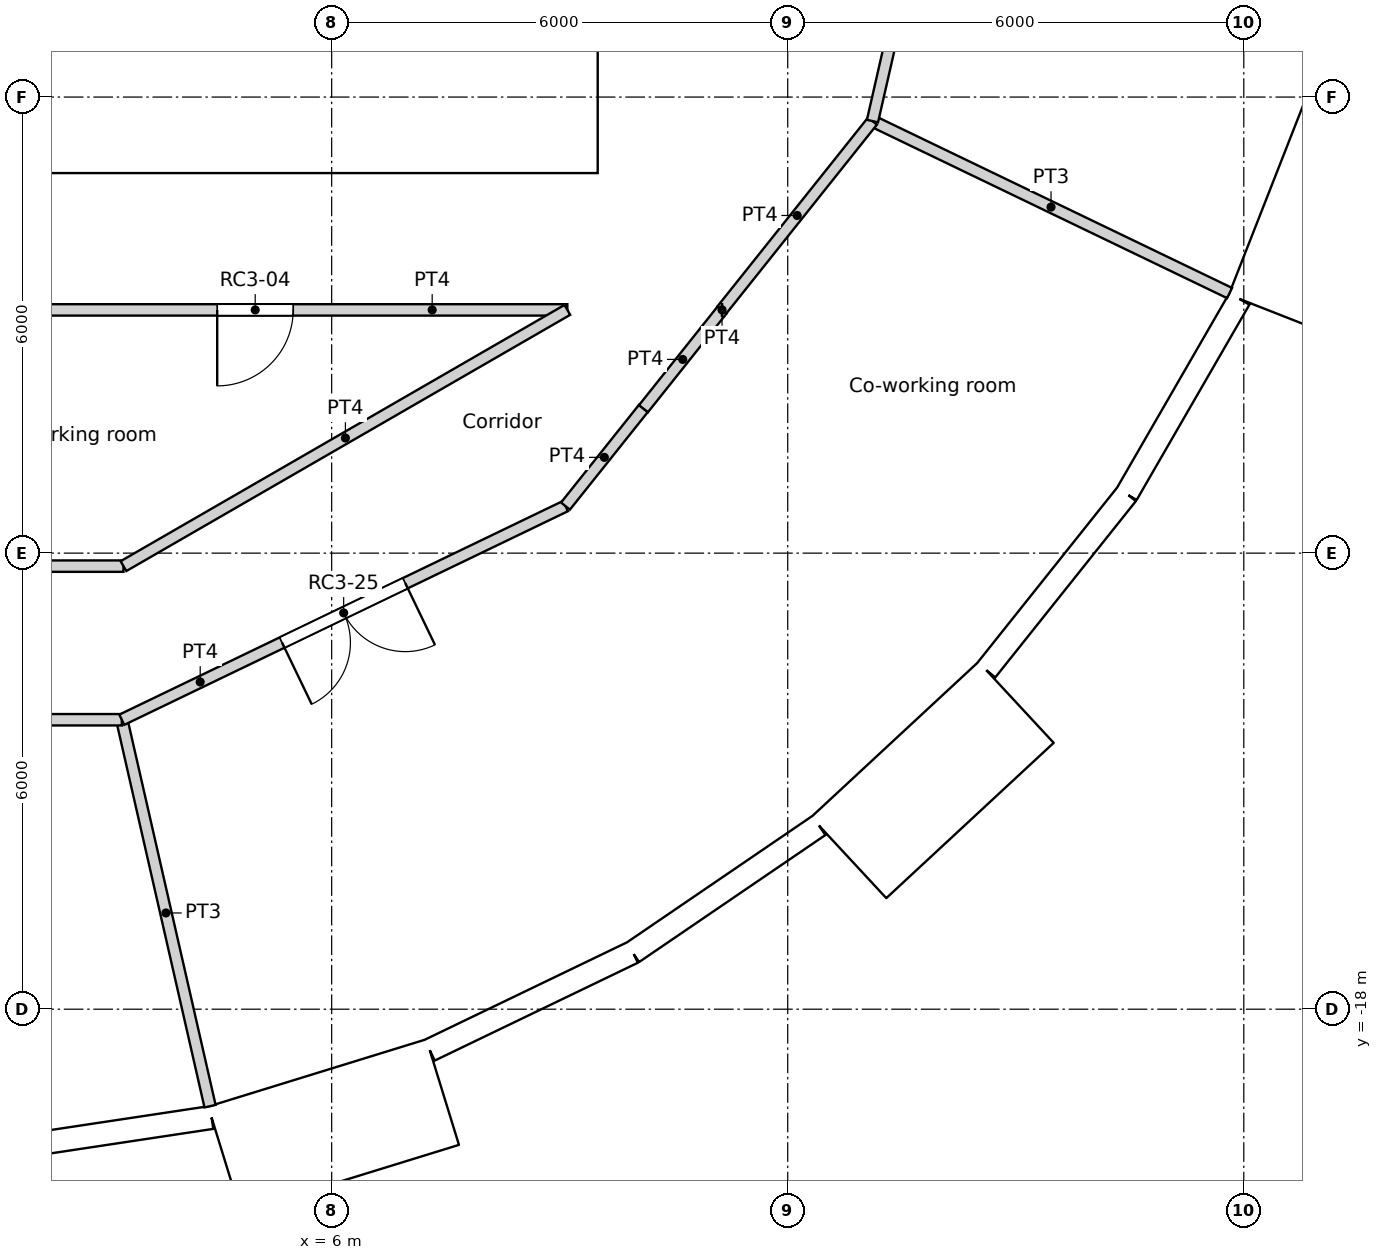
"""IFC4 building model, lengths in metres.
Left out: names, types, materials, properties, quantities, classifications, styles, units other than length and angle.
Written with IfcOpenShell. Run it as: python <this file> out.ifc"""

import sys

from ifc_helpers import new_model, si_unit, direction, frame, frame_2d, origin, origin_2d, place, context, subcontext, project, spatial, rectangle, circle, extrude, element, fill, save


model = new_model("IFC4")
c1 = context("Model", 3, precision=1e-05, world=origin(), true_north=direction((0.0, 1.0)))
c2 = subcontext(c1, "Body", "Model", "MODEL_VIEW")
j1 = project(units=[si_unit("LENGTHUNIT", "METRE"), si_unit("PLANEANGLEUNIT", "RADIAN")], contexts=[c1])
p1 = place(None, origin())
s1 = spatial("IfcSite", under=j1, at=p1, CompositionType="ELEMENT")
p2 = place(p1, origin())
s2 = spatial("IfcBuilding", under=s1, at=p2, CompositionType="ELEMENT")
p3 = place(p2, frame((0.0, 0.0, 252.6)))
s3 = spatial("IfcBuildingStorey", under=s2, at=p3, CompositionType="ELEMENT", Elevation=252.6)
for number, where, z_axis, x_axis in (
    (1, (6.876, -17.521, 0.0), (0.0, 0.0, 1.0), (1.0, 0.0, 0.0)),
    (2, (11.735, -14.716, 0.0), (0.0, 0.0, 1.0), (1.0, 0.0, 0.0)),
    (3, (15.552, -10.603, 0.0), (0.0, 0.0, 1.0), (1.0, 0.0, 0.0)),
    (4, (17.986, -5.548, 0.0), (0.0, 0.0, 1.0), (1.0, 0.0, 0.0)),
):
    element("IfcColumn", number, at=place(p3, frame(where, z_axis=z_axis, x_axis=x_axis)), inside=s3, PredefinedType="COLUMN", context=c2, shape_type="SweptSolid", body=[
        extrude(circle(Radius=0.55, at=origin_2d()), origin(), (0.0, 0.0, 1.0), 3.6),
    ])
p4 = place(p3, frame((1.489, -19.866, 0.0), z_axis=(0.0, 0.0, 1.0), x_axis=(0.988835775663, 0.149009425104, 0.0)))
e5 = element("IfcWall", 5, at=p4, inside=s3, PredefinedType="SOLIDWALL", context=c2, shape_type="SweptSolid", body=[
    extrude(rectangle(XDim=2.962, YDim=0.3, at=frame_2d((1.481, 0.0))), origin(), (0.0, 0.0, 1.0), 3.25),
])
p5 = place(p4, frame((1.481, 0.0, 1.55)))
e6 = element("IfcOpeningElement", 6, at=p5, cuts=e5, PredefinedType="OPENING", context=c2, shape_type="SweptSolid", body=[
    extrude(circle(Radius=0.9, at=origin_2d()), frame((0.0, 0.16, 0.0), z_axis=(0.0, -1.0, 0.0), x_axis=(1.0, 0.0, 0.0)), (0.0, 0.0, 1.0), 0.32),
])
p6 = place(p3, frame((4.592, -19.975, -0.35), z_axis=(0.0, 0.0, 1.0), x_axis=(0.955571139978, 0.294760574774, 0.0)))
e7 = element("IfcWall", 7, at=p6, inside=s3, PredefinedType="ELEMENTEDWALL", context=c2, shape_type="SweptSolid", body=[
    extrude(rectangle(XDim=3.0, YDim=1.45, at=frame_2d((1.5, 0.0))), origin(), (0.0, 0.0, 1.0), 3.6),
])
p7 = place(p6, frame((1.5, 0.0, 1.9)))
e8 = element("IfcOpeningElement", 8, at=p7, cuts=e7, PredefinedType="OPENING", context=c2, shape_type="SweptSolid", body=[
    extrude(circle(Radius=0.9, at=origin_2d()), frame((0.0, 0.735, 0.0), z_axis=(0.0, -1.0, 0.0), x_axis=(1.0, 0.0, 0.0)), (0.0, 0.0, 1.0), 1.47),
])
p8 = place(p3, frame((7.292, -18.538, 0.0), z_axis=(0.0, 0.0, 1.0), x_axis=(0.90095513435, 0.433912255978, 0.0)))
e9 = element("IfcWall", 9, at=p8, inside=s3, PredefinedType="SOLIDWALL", context=c2, shape_type="SweptSolid", body=[
    extrude(rectangle(XDim=2.962, YDim=0.3, at=frame_2d((1.481, 0.0))), origin(), (0.0, 0.0, 1.0), 3.25),
])
p9 = place(p8, frame((1.481, 0.0, 1.55)))
e10 = element("IfcOpeningElement", 10, at=p9, cuts=e9, PredefinedType="OPENING", context=c2, shape_type="SweptSolid", body=[
    extrude(circle(Radius=0.9, at=origin_2d()), frame((0.0, 0.16, 0.0), z_axis=(0.0, -1.0, 0.0), x_axis=(1.0, 0.0, 0.0)), (0.0, 0.0, 1.0), 0.32),
])
p10 = place(p3, frame((9.961, -17.253, 0.0), z_axis=(0.0, 0.0, 1.0), x_axis=(0.826236061068, 0.563324037646, 0.0)))
e11 = element("IfcWall", 11, at=p10, inside=s3, PredefinedType="SOLIDWALL", context=c2, shape_type="SweptSolid", body=[
    extrude(rectangle(XDim=2.962, YDim=0.3, at=frame_2d((1.481, 0.0))), origin(), (0.0, 0.0, 1.0), 3.25),
])
p11 = place(p10, frame((1.481, 0.0, 1.55)))
e12 = element("IfcOpeningElement", 12, at=p11, cuts=e11, PredefinedType="OPENING", context=c2, shape_type="SweptSolid", body=[
    extrude(circle(Radius=0.9, at=origin_2d()), frame((0.0, 0.16, 0.0), z_axis=(0.0, -1.0, 0.0), x_axis=(1.0, 0.0, 0.0)), (0.0, 0.0, 1.0), 0.32),
])
p12 = place(p3, frame((12.804, -16.005, -0.35), z_axis=(0.0, 0.0, 1.0), x_axis=(0.733022439167, 0.680204457261, 0.0)))
e13 = element("IfcWall", 13, at=p12, inside=s3, PredefinedType="ELEMENTEDWALL", context=c2, shape_type="SweptSolid", body=[
    extrude(rectangle(XDim=3.0, YDim=1.45, at=frame_2d((1.5, 0.0))), origin(), (0.0, 0.0, 1.0), 3.6),
])
p13 = place(p12, frame((1.5, 0.0, 1.9)))
e14 = element("IfcOpeningElement", 14, at=p13, cuts=e13, PredefinedType="OPENING", context=c2, shape_type="SweptSolid", body=[
    extrude(circle(Radius=0.9, at=origin_2d()), frame((0.0, 0.735, 0.0), z_axis=(0.0, -1.0, 0.0), x_axis=(1.0, 0.0, 0.0)), (0.0, 0.0, 1.0), 1.47),
])
p14 = place(p3, frame((14.613, -13.538, 0.0), z_axis=(0.0, 0.0, 1.0), x_axis=(0.623498236992, 0.781824755599, 0.0)))
e15 = element("IfcWall", 15, at=p14, inside=s3, PredefinedType="SOLIDWALL", context=c2, shape_type="SweptSolid", body=[
    extrude(rectangle(XDim=2.962, YDim=0.3, at=frame_2d((1.481, 0.0))), origin(), (0.0, 0.0, 1.0), 3.25),
])
p15 = place(p14, frame((1.481, 0.0, 1.55)))
e16 = element("IfcOpeningElement", 16, at=p15, cuts=e15, PredefinedType="OPENING", context=c2, shape_type="SweptSolid", body=[
    extrude(circle(Radius=0.9, at=origin_2d()), frame((0.0, 0.16, 0.0), z_axis=(0.0, -1.0, 0.0), x_axis=(1.0, 0.0, 0.0)), (0.0, 0.0, 1.0), 0.32),
])
p16 = place(p3, frame((16.46, -11.222, 0.0), z_axis=(0.0, 0.0, 1.0), x_axis=(0.499950756475, 0.86605383268, 0.0)))
e17 = element("IfcWall", 17, at=p16, inside=s3, PredefinedType="SOLIDWALL", context=c2, shape_type="SweptSolid", body=[
    extrude(rectangle(XDim=2.962, YDim=0.3, at=frame_2d((1.481, 0.0))), origin(), (0.0, 0.0, 1.0), 3.25),
])
p17 = place(p16, frame((1.481, 0.0, 1.55)))
e18 = element("IfcOpeningElement", 18, at=p17, cuts=e17, PredefinedType="OPENING", context=c2, shape_type="SweptSolid", body=[
    extrude(circle(Radius=0.9, at=origin_2d()), frame((0.0, 0.16, 0.0), z_axis=(0.0, -1.0, 0.0), x_axis=(1.0, 0.0, 0.0)), (0.0, 0.0, 1.0), 0.32),
])
p18 = place(p3, frame((18.48, -8.864, -0.35), z_axis=(0.0, 0.0, 1.0), x_axis=(0.36537792632, 0.93085926485, 0.0)))
e19 = element("IfcWall", 19, at=p18, inside=s3, PredefinedType="ELEMENTEDWALL", context=c2, shape_type="SweptSolid", body=[
    extrude(rectangle(XDim=3.0, YDim=1.45, at=frame_2d((1.5, 0.0))), origin(), (0.0, 0.0, 1.0), 3.6),
])
p19 = place(p18, frame((1.5, 0.0, 1.9)))
e20 = element("IfcOpeningElement", 20, at=p19, cuts=e19, PredefinedType="OPENING", context=c2, shape_type="SweptSolid", body=[
    extrude(circle(Radius=0.9, at=origin_2d()), frame((0.0, 0.735, 0.0), z_axis=(0.0, -1.0, 0.0), x_axis=(1.0, 0.0, 0.0)), (0.0, 0.0, 1.0), 1.47),
])
p20 = place(p3, frame((-9.5, -6.7, 0.0), z_axis=(0.0, 0.0, 1.0), x_axis=(1.0, 0.0, 0.0)))
e21 = element("IfcWall", 21, at=p20, inside=s3, PredefinedType="SOLIDWALL", context=c2, shape_type="SweptSolid", body=[
    extrude(rectangle(XDim=19.0, YDim=0.6, at=frame_2d((9.5, 0.0))), origin(), (0.0, 0.0, 1.0), 3.6),
])
p21 = place(p20, frame((10.4, 0.0, 0.0)))
e22 = element("IfcOpeningElement", 22, at=p21, cuts=e21, PredefinedType="OPENING", context=c2, shape_type="SweptSolid", body=[
    extrude(rectangle(XDim=1.0, YDim=2.1, at=frame_2d((0.5, 1.05))), frame((0.0, 0.3, 0.0), z_axis=(0.0, -1.0, 0.0), x_axis=(1.0, 0.0, 0.0)), (0.0, 0.0, 1.0), 0.6),
])
p22 = place(p20, frame((5.35, 0.0, 0.0)))
e23 = element("IfcOpeningElement", 23, at=p22, cuts=e21, PredefinedType="OPENING", context=c2, shape_type="SweptSolid", body=[
    extrude(rectangle(XDim=1.7, YDim=2.1, at=frame_2d((0.85, 1.05))), frame((0.0, 0.3, 0.0), z_axis=(0.0, -1.0, 0.0), x_axis=(1.0, 0.0, 0.0)), (0.0, 0.0, 1.0), 0.6),
])
p23 = place(p20, frame((11.95, 0.0, 0.0)))
e24 = element("IfcOpeningElement", 24, at=p23, cuts=e21, PredefinedType="OPENING", context=c2, shape_type="SweptSolid", body=[
    extrude(rectangle(XDim=1.7, YDim=2.1, at=frame_2d((0.85, 1.05))), frame((0.0, 0.3, 0.0), z_axis=(0.0, -1.0, 0.0), x_axis=(1.0, 0.0, 0.0)), (0.0, 0.0, 1.0), 0.6),
])
p24 = place(p3, frame((9.2, -6.4, 0.0), z_axis=(0.0, 0.0, 1.0), x_axis=(0.0, 1.0, 0.0)))
e25 = element("IfcWall", 25, at=p24, inside=s3, PredefinedType="SOLIDWALL", context=c2, shape_type="SweptSolid", body=[
    extrude(rectangle(XDim=12.8, YDim=0.6, at=frame_2d((6.4, 0.0))), origin(), (0.0, 0.0, 1.0), 3.6),
])
p25 = place(p24, frame((6.4, 0.0, 0.0)))
e26 = element("IfcOpeningElement", 26, at=p25, cuts=e25, PredefinedType="OPENING", context=c2, shape_type="SweptSolid", body=[
    extrude(rectangle(XDim=1.8, YDim=2.1, at=frame_2d((0.9, 1.05))), frame((0.0, 0.3, 0.0), z_axis=(0.0, -1.0, 0.0), x_axis=(1.0, 0.0, 0.0)), (0.0, 0.0, 1.0), 0.6),
])
p26 = place(p3, frame((2.25, -6.4, 0.0), z_axis=(0.0, 0.0, 1.0), x_axis=(0.0, 1.0, 0.0)))
e27 = element("IfcWall", 27, at=p26, inside=s3, PredefinedType="SOLIDWALL", context=c2, shape_type="SweptSolid", body=[
    extrude(rectangle(XDim=3.15, YDim=0.3, at=frame_2d((1.575, 0.0))), origin(), (0.0, 0.0, 1.0), 3.25),
])
p27 = place(p3, frame((0.896, -8.8, 0.0), z_axis=(0.0, 0.0, 1.0), x_axis=(1.0, 0.0, 0.0)))
e28 = element("IfcWall", 28, at=p27, inside=s3, PredefinedType="PARTITIONING", context=c2, shape_type="SweptSolid", body=[
    extrude(rectangle(XDim=8.205, YDim=0.15, at=frame_2d((4.102, 0.0))), origin(), (0.0, 0.0, 1.0), 3.25),
])
p28 = place(p27, frame((3.598, 0.0, 0.0)))
e29 = element("IfcOpeningElement", 29, at=p28, cuts=e28, PredefinedType="OPENING", context=c2, shape_type="SweptSolid", body=[
    extrude(rectangle(XDim=1.0, YDim=2.04, at=frame_2d((0.5, 1.02))), frame((0.0, 0.075, 0.0), z_axis=(0.0, -1.0, 0.0), x_axis=(1.0, 0.0, 0.0)), (0.0, 0.0, 1.0), 0.15),
])
p29 = place(p3, frame((11.137, -8.8, 0.0), z_axis=(0.0, 0.0, 1.0), x_axis=(-1.0, 0.0, 0.0)))
e30 = element("IfcWall", 30, at=p29, inside=s3, PredefinedType="PARTITIONING", context=c2, shape_type="SweptSolid", body=[
    extrude(rectangle(XDim=0.003, YDim=0.15, at=frame_2d((0.001, 0.0))), origin(), (0.0, 0.0, 1.0), 3.25),
])
p30 = place(p3, frame((10.101, -10.101, 0.0), z_axis=(0.0, 0.0, 1.0), x_axis=(0.623098344652, 0.782143498913, 0.0)))
e31 = element("IfcWall", 31, at=p30, inside=s3, PredefinedType="PARTITIONING", context=c2, shape_type="SweptSolid", body=[
    extrude(rectangle(XDim=1.661, YDim=0.15, at=frame_2d((0.831, 0.0))), origin(), (0.0, 0.0, 1.0), 3.25),
])
p31 = place(p3, frame((11.134, -8.8, 0.0), z_axis=(0.0, 0.0, 1.0), x_axis=(0.623476099415, 0.781842409606, 0.0)))
e32 = element("IfcWall", 32, at=p31, inside=s3, PredefinedType="PARTITIONING", context=c2, shape_type="SweptSolid", body=[
    extrude(rectangle(XDim=3.177, YDim=0.15, at=frame_2d((1.589, 0.0))), origin(), (0.0, 0.0, 1.0), 3.25),
])
p32 = place(p3, frame((13.115, -6.316, 0.0), z_axis=(0.0, 0.0, 1.0), x_axis=(0.222568978642, 0.97491694505, 0.0)))
e33 = element("IfcWall", 33, at=p32, inside=s3, PredefinedType="PARTITIONING", context=c2, shape_type="SweptSolid", body=[
    extrude(rectangle(XDim=6.479, YDim=0.15, at=frame_2d((3.239, 0.0))), origin(), (0.0, 0.0, 1.0), 3.25),
])
p33 = place(p32, frame((2.74, 0.0, 0.0)))
e34 = element("IfcOpeningElement", 34, at=p33, cuts=e33, PredefinedType="OPENING", context=c2, shape_type="SweptSolid", body=[
    extrude(rectangle(XDim=1.0, YDim=2.04, at=frame_2d((0.5, 1.02))), frame((0.0, 0.075, 0.0), z_axis=(0.0, -1.0, 0.0), x_axis=(1.0, 0.0, 0.0)), (0.0, 0.0, 1.0), 0.15),
])
p34 = place(p3, frame((0.9, -12.171, 0.0), z_axis=(0.0, 0.0, 1.0), x_axis=(1.0, 0.0, 0.0)))
e35 = element("IfcWall", 35, at=p34, inside=s3, PredefinedType="PARTITIONING", context=c2, shape_type="SweptSolid", body=[
    extrude(rectangle(XDim=2.361, YDim=0.15, at=frame_2d((1.181, 0.0))), origin(), (0.0, 0.0, 1.0), 3.25),
])
p35 = place(p3, frame((3.261, -12.171, 0.0), z_axis=(0.0, 0.0, 1.0), x_axis=(0.866066809554, 0.499928276245, 0.0)))
e36 = element("IfcWall", 36, at=p35, inside=s3, PredefinedType="PARTITIONING", context=c2, shape_type="SweptSolid", body=[
    extrude(rectangle(XDim=6.743, YDim=0.15, at=frame_2d((3.371, 0.0))), origin(), (0.0, 0.0, 1.0), 3.25),
])
p36 = place(p3, frame((-3.239, -14.192, 0.0), z_axis=(0.0, 0.0, 1.0), x_axis=(1.0, 0.0, 0.0)))
e37 = element("IfcWall", 37, at=p36, inside=s3, PredefinedType="PARTITIONING", context=c2, shape_type="SweptSolid", body=[
    extrude(rectangle(XDim=6.478, YDim=0.15, at=frame_2d((3.239, 0.0))), origin(), (0.0, 0.0, 1.0), 3.25),
])
p37 = place(p36, frame((2.739, 0.0, 0.0)))
e38 = element("IfcOpeningElement", 38, at=p37, cuts=e37, PredefinedType="OPENING", context=c2, shape_type="SweptSolid", body=[
    extrude(rectangle(XDim=1.0, YDim=2.04, at=frame_2d((0.5, 1.02))), frame((0.0, 0.075, 0.0), z_axis=(0.0, -1.0, 0.0), x_axis=(1.0, 0.0, 0.0)), (0.0, 0.0, 1.0), 0.15),
])
p38 = place(p3, frame((9.076, -11.381, 0.0), z_axis=(0.0, 0.0, 1.0), x_axis=(0.623805208652, 0.781579849829, 0.0)))
e39 = element("IfcWall", 39, at=p38, inside=s3, PredefinedType="PARTITIONING", context=c2, shape_type="SweptSolid", body=[
    extrude(rectangle(XDim=1.64, YDim=0.15, at=frame_2d((0.82, 0.0))), origin(), (0.0, 0.0, 1.0), 3.25),
])
p39 = place(p3, frame((3.239, -14.192, 0.0), z_axis=(0.0, 0.0, 1.0), x_axis=(0.900976027191, 0.433868872388, 0.0)))
e40 = element("IfcWall", 40, at=p39, inside=s3, PredefinedType="PARTITIONING", context=c2, shape_type="SweptSolid", body=[
    extrude(rectangle(XDim=6.479, YDim=0.15, at=frame_2d((3.239, 0.0))), origin(), (0.0, 0.0, 1.0), 3.25),
])
p40 = place(p39, frame((2.34, 0.0, 0.0)))
e41 = element("IfcOpeningElement", 41, at=p40, cuts=e40, PredefinedType="OPENING", context=c2, shape_type="SweptSolid", body=[
    extrude(rectangle(XDim=1.8, YDim=2.1, at=frame_2d((0.9, 1.05))), frame((0.0, 0.075, 0.0), z_axis=(0.0, -1.0, 0.0), x_axis=(1.0, 0.0, 0.0)), (0.0, 0.0, 1.0), 0.15),
])
p41 = place(p3, frame((3.239, -14.192, 0.0), z_axis=(0.0, 0.0, 1.0), x_axis=(0.222612505682, -0.974907007008, 0.0)))
e42 = element("IfcWall", 42, at=p41, inside=s3, PredefinedType="PARTITIONING", context=c2, shape_type="SweptSolid", body=[
    extrude(rectangle(XDim=5.215, YDim=0.15, at=frame_2d((2.607, 0.0))), origin(), (0.0, 0.0, 1.0), 3.25),
])
p42 = place(p3, frame((13.115, -6.316, 0.0), z_axis=(0.0, 0.0, 1.0), x_axis=(0.901004381064, -0.433809987557, 0.0)))
e43 = element("IfcWall", 43, at=p42, inside=s3, PredefinedType="PARTITIONING", context=c2, shape_type="SweptSolid", body=[
    extrude(rectangle(XDim=5.214, YDim=0.15, at=frame_2d((2.607, 0.0))), origin(), (0.0, 0.0, 1.0), 3.25),
])
p43 = place(p5, origin())
e44 = element("IfcWindow", 44, at=p43, inside=s3, PartitioningType="SINGLE_PANEL", PredefinedType="WINDOW", context=c2, shape_type="SweptSolid", body=[
    extrude(circle(Radius=0.9, at=origin_2d()), frame((0.0, 0.12, 0.0), z_axis=(0.0, -1.0, 0.0), x_axis=(1.0, 0.0, 0.0)), (0.0, 0.0, 1.0), 0.1),
])
fill(e6, e44)
p44 = place(p7, origin())
e45 = element("IfcWindow", 45, at=p44, inside=s3, PartitioningType="SINGLE_PANEL", PredefinedType="WINDOW", context=c2, shape_type="SweptSolid", body=[
    extrude(circle(Radius=0.9, at=origin_2d()), frame((0.0, 0.695, 0.0), z_axis=(0.0, -1.0, 0.0), x_axis=(1.0, 0.0, 0.0)), (0.0, 0.0, 1.0), 0.1),
])
fill(e8, e45)
p45 = place(p9, origin())
e46 = element("IfcWindow", 46, at=p45, inside=s3, PartitioningType="SINGLE_PANEL", PredefinedType="WINDOW", context=c2, shape_type="SweptSolid", body=[
    extrude(circle(Radius=0.9, at=origin_2d()), frame((0.0, 0.12, 0.0), z_axis=(0.0, -1.0, 0.0), x_axis=(1.0, 0.0, 0.0)), (0.0, 0.0, 1.0), 0.1),
])
fill(e10, e46)
p46 = place(p11, origin())
e47 = element("IfcWindow", 47, at=p46, inside=s3, PartitioningType="SINGLE_PANEL", PredefinedType="WINDOW", context=c2, shape_type="SweptSolid", body=[
    extrude(circle(Radius=0.9, at=origin_2d()), frame((0.0, 0.12, 0.0), z_axis=(0.0, -1.0, 0.0), x_axis=(1.0, 0.0, 0.0)), (0.0, 0.0, 1.0), 0.1),
])
fill(e12, e47)
p47 = place(p13, origin())
e48 = element("IfcWindow", 48, at=p47, inside=s3, PartitioningType="SINGLE_PANEL", PredefinedType="WINDOW", context=c2, shape_type="SweptSolid", body=[
    extrude(circle(Radius=0.9, at=origin_2d()), frame((0.0, 0.695, 0.0), z_axis=(0.0, -1.0, 0.0), x_axis=(1.0, 0.0, 0.0)), (0.0, 0.0, 1.0), 0.1),
])
fill(e14, e48)
p48 = place(p15, origin())
e49 = element("IfcWindow", 49, at=p48, inside=s3, PartitioningType="SINGLE_PANEL", PredefinedType="WINDOW", context=c2, shape_type="SweptSolid", body=[
    extrude(circle(Radius=0.9, at=origin_2d()), frame((0.0, 0.12, 0.0), z_axis=(0.0, -1.0, 0.0), x_axis=(1.0, 0.0, 0.0)), (0.0, 0.0, 1.0), 0.1),
])
fill(e16, e49)
p49 = place(p17, origin())
e50 = element("IfcWindow", 50, at=p49, inside=s3, PartitioningType="SINGLE_PANEL", PredefinedType="WINDOW", context=c2, shape_type="SweptSolid", body=[
    extrude(circle(Radius=0.9, at=origin_2d()), frame((0.0, 0.12, 0.0), z_axis=(0.0, -1.0, 0.0), x_axis=(1.0, 0.0, 0.0)), (0.0, 0.0, 1.0), 0.1),
])
fill(e18, e50)
p50 = place(p19, origin())
e51 = element("IfcWindow", 51, at=p50, inside=s3, PartitioningType="SINGLE_PANEL", PredefinedType="WINDOW", context=c2, shape_type="SweptSolid", body=[
    extrude(circle(Radius=0.9, at=origin_2d()), frame((0.0, 0.695, 0.0), z_axis=(0.0, -1.0, 0.0), x_axis=(1.0, 0.0, 0.0)), (0.0, 0.0, 1.0), 0.1),
])
fill(e20, e51)
p51 = place(p23, origin())
e52 = element("IfcDoor", 52, at=p51, inside=s3, OperationType="DOUBLE_DOOR_SINGLE_SWING", PredefinedType="DOOR", context=c2, shape_type="SweptSolid", body=[
    extrude(rectangle(XDim=1.7, YDim=2.1, at=frame_2d((0.85, 1.05))), frame((0.0, 0.025, 0.0), z_axis=(0.0, -1.0, 0.0), x_axis=(1.0, 0.0, 0.0)), (0.0, 0.0, 1.0), 0.05),
])
fill(e24, e52)
p52 = place(p28, origin())
e53 = element("IfcDoor", 53, at=p52, inside=s3, OperationType="SINGLE_SWING_RIGHT", PredefinedType="DOOR", context=c2, shape_type="SweptSolid", body=[
    extrude(rectangle(XDim=1.0, YDim=2.04, at=frame_2d((0.5, 1.02))), frame((0.0, 0.025, 0.0), z_axis=(0.0, -1.0, 0.0), x_axis=(1.0, 0.0, 0.0)), (0.0, 0.0, 1.0), 0.05),
])
fill(e29, e53)
p53 = place(p40, origin())
e54 = element("IfcDoor", 54, at=p53, inside=s3, OperationType="DOUBLE_DOOR_SINGLE_SWING", PredefinedType="DOOR", context=c2, shape_type="SweptSolid", body=[
    extrude(rectangle(XDim=1.8, YDim=2.1, at=frame_2d((0.9, 1.05))), frame((0.0, 0.025, 0.0), z_axis=(0.0, -1.0, 0.0), x_axis=(1.0, 0.0, 0.0)), (0.0, 0.0, 1.0), 0.05),
])
fill(e41, e54)
save(model, sys.argv[1])
